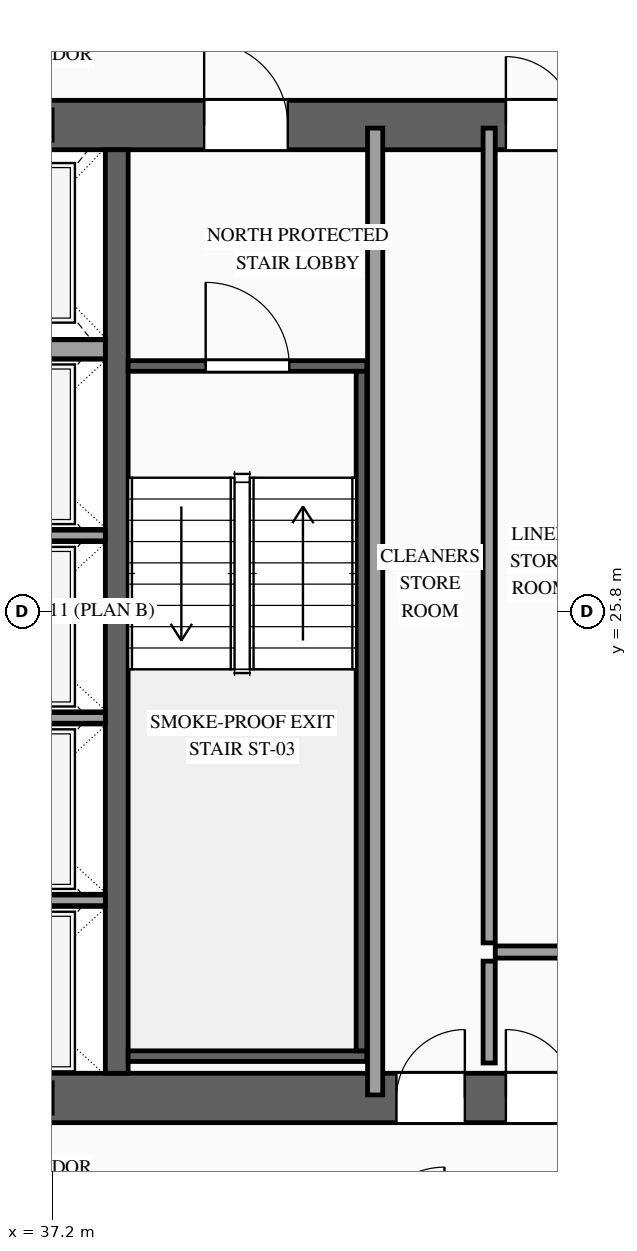
"""IFC4 building model, lengths in metres.
Left out: names, types, materials, properties, quantities, classifications, styles, units other than length and angle.
Written with IfcOpenShell. Run it as: python <this file> out.ifc"""

import sys

from ifc_helpers import new_model, si_unit, direction, frame, frame_2d, origin, place, context, subcontext, project, spatial, rectangle, extrude, source, transform, mapped, element, fill, save


model = new_model("IFC4")
c1 = context("Model", 3, precision=1e-05, world=origin(), true_north=direction((0.0, 1.0)))
c2 = subcontext(c1, "Body", "Model", "MODEL_VIEW")
j1 = project(units=[si_unit("LENGTHUNIT", "METRE"), si_unit("PLANEANGLEUNIT", "RADIAN")], contexts=[c1])
p1 = place(None, origin())
s1 = spatial("IfcSite", under=j1, at=p1, CompositionType="ELEMENT")
p2 = place(p1, origin())
s2 = spatial("IfcBuilding", under=s1, at=p2, CompositionType="ELEMENT")
p3 = place(p2, frame((0.0, 0.0, 181.0)))
s3 = spatial("IfcBuildingStorey", under=s2, at=p3, CompositionType="ELEMENT", Elevation=181.0)
p4 = place(p3, frame((23.475, 19.4, 0.0), z_axis=(0.0, 0.0, 1.0), x_axis=(1.0, 0.0, 0.0)))
e1 = element("IfcWall", 1, at=p4, inside=s3, PredefinedType="SHEAR", context=c2, shape_type="SweptSolid", body=[
    extrude(rectangle(XDim=27.05, YDim=0.65, at=frame_2d((13.525, 0.0))), origin(), (0.0, 0.0, 1.0), 3.5),
])
p5 = place(p4, frame((1.975, 0.0, 0.0)))
e2 = element("IfcOpeningElement", 2, at=p5, cuts=e1, PredefinedType="OPENING", context=c2, shape_type="SweptSolid", body=[
    extrude(rectangle(XDim=1.1, YDim=2.2, at=frame_2d((0.55, 1.1))), frame((0.0, 0.34, 0.0), z_axis=(0.0, -1.0, 0.0), x_axis=(1.0, 0.0, 0.0)), (0.0, 0.0, 1.0), 0.68),
])
p6 = place(p4, frame((9.875, 0.0, 0.0)))
e3 = element("IfcOpeningElement", 3, at=p6, cuts=e1, PredefinedType="OPENING", context=c2, shape_type="SweptSolid", body=[
    extrude(rectangle(XDim=1.1, YDim=2.2, at=frame_2d((0.55, 1.1))), frame((0.0, 0.34, 0.0), z_axis=(0.0, -1.0, 0.0), x_axis=(1.0, 0.0, 0.0)), (0.0, 0.0, 1.0), 0.68),
])
p7 = place(p4, frame((23.075, 0.0, 0.0)))
e4 = element("IfcOpeningElement", 4, at=p7, cuts=e1, PredefinedType="OPENING", context=c2, shape_type="SweptSolid", body=[
    extrude(rectangle(XDim=1.1, YDim=2.2, at=frame_2d((0.55, 1.1))), frame((0.0, 0.34, 0.0), z_axis=(0.0, -1.0, 0.0), x_axis=(1.0, 0.0, 0.0)), (0.0, 0.0, 1.0), 0.68),
])
p8 = place(p4, frame((19.695, 0.0, 0.0)))
e5 = element("IfcOpeningElement", 5, at=p8, cuts=e1, PredefinedType="OPENING", context=c2, shape_type="SweptSolid", body=[
    extrude(rectangle(XDim=0.9, YDim=2.15, at=frame_2d((0.45, 1.075))), frame((0.0, 0.34, 0.0), z_axis=(0.0, -1.0, 0.0), x_axis=(1.0, 0.0, 0.0)), (0.0, 0.0, 1.0), 0.68),
])
p9 = place(p4, frame((18.255, 0.0, 0.0)))
e6 = element("IfcOpeningElement", 6, at=p9, cuts=e1, PredefinedType="OPENING", context=c2, shape_type="SweptSolid", body=[
    extrude(rectangle(XDim=0.9, YDim=2.15, at=frame_2d((0.45, 1.075))), frame((0.0, 0.34, 0.0), z_axis=(0.0, -1.0, 0.0), x_axis=(1.0, 0.0, 0.0)), (0.0, 0.0, 1.0), 0.68),
])
p10 = place(p3, frame((23.475, 32.2, 0.0), z_axis=(0.0, 0.0, 1.0), x_axis=(1.0, 0.0, 0.0)))
e7 = element("IfcWall", 7, at=p10, inside=s3, PredefinedType="SHEAR", context=c2, shape_type="SweptSolid", body=[
    extrude(rectangle(XDim=27.05, YDim=0.65, at=frame_2d((13.525, 0.0))), origin(), (0.0, 0.0, 1.0), 3.5),
])
p11 = place(p10, frame((4.595, 0.0, 0.0)))
e8 = element("IfcOpeningElement", 8, at=p11, cuts=e7, PredefinedType="OPENING", context=c2, shape_type="SweptSolid", body=[
    extrude(rectangle(XDim=0.9, YDim=2.15, at=frame_2d((0.45, 1.075))), frame((0.0, 0.34, 0.0), z_axis=(0.0, -1.0, 0.0), x_axis=(1.0, 0.0, 0.0)), (0.0, 0.0, 1.0), 0.68),
])
p12 = place(p10, frame((9.875, 0.0, 0.0)))
e9 = element("IfcOpeningElement", 9, at=p12, cuts=e7, PredefinedType="OPENING", context=c2, shape_type="SweptSolid", body=[
    extrude(rectangle(XDim=1.1, YDim=2.2, at=frame_2d((0.55, 1.1))), frame((0.0, 0.34, 0.0), z_axis=(0.0, -1.0, 0.0), x_axis=(1.0, 0.0, 0.0)), (0.0, 0.0, 1.0), 0.68),
])
p13 = place(p10, frame((15.725, 0.0, 0.0)))
e10 = element("IfcOpeningElement", 10, at=p13, cuts=e7, PredefinedType="OPENING", context=c2, shape_type="SweptSolid", body=[
    extrude(rectangle(XDim=1.1, YDim=2.2, at=frame_2d((0.55, 1.1))), frame((0.0, 0.34, 0.0), z_axis=(0.0, -1.0, 0.0), x_axis=(1.0, 0.0, 0.0)), (0.0, 0.0, 1.0), 0.68),
])
p14 = place(p10, frame((19.695, 0.0, 0.0)))
e11 = element("IfcOpeningElement", 11, at=p14, cuts=e7, PredefinedType="OPENING", context=c2, shape_type="SweptSolid", body=[
    extrude(rectangle(XDim=0.9, YDim=2.15, at=frame_2d((0.45, 1.075))), frame((0.0, 0.34, 0.0), z_axis=(0.0, -1.0, 0.0), x_axis=(1.0, 0.0, 0.0)), (0.0, 0.0, 1.0), 0.68),
])
m1 = source(origin(), c2, "Body", "SweptSolid", [
    extrude(rectangle(XDim=12.15, YDim=0.3, at=frame_2d((6.075, 0.0))), origin(), (0.0, 0.0, 1.0), 3.5),
])
p15 = place(p3, frame((38.05, 19.725, 0.0), z_axis=(0.0, 0.0, 1.0), x_axis=(0.0, 1.0, 0.0)))
e12 = element("IfcWall", 12, at=p15, inside=s3, PredefinedType="SOLIDWALL", context=c2, shape_type="MappedRepresentation", body=[
    mapped(m1, transform((0.0, 0.0, 0.0), scale=1.0)),
])
m2 = source(origin(), c2, "Body", "SweptSolid", [
    extrude(rectangle(XDim=2.4, YDim=0.14, at=frame_2d((1.2, 0.0))), origin(), (0.0, 0.0, 1.0), 3.28),
])
for number, where, z_axis, x_axis in (
    (13, (35.5, 22.0, 0.0), (0.0, 0.0, 1.0), (1.0, 0.0, 0.0)),
    (14, (35.5, 24.4, 0.0), (0.0, 0.0, 1.0), (1.0, 0.0, 0.0)),
    (15, (35.5, 26.8, 0.0), (0.0, 0.0, 1.0), (1.0, 0.0, 0.0)),
):
    element("IfcWall", number, at=place(p3, frame(where, z_axis=z_axis, x_axis=x_axis)), inside=s3, PredefinedType="SOLIDWALL", context=c2, shape_type="MappedRepresentation", body=[
        mapped(m2, transform((0.0, 0.0, 0.0), scale=1.0)),
    ])
m3 = source(origin(), c2, "Body", "SweptSolid", [
    extrude(rectangle(XDim=2.4, YDim=0.25, at=frame_2d((1.2, 0.0))), origin(), (0.0, 0.0, 1.0), 3.28),
])
p16 = place(p3, frame((35.5, 29.25, 0.0), z_axis=(0.0, 0.0, 1.0), x_axis=(1.0, 0.0, 0.0)))
e16 = element("IfcWall", 16, at=p16, inside=s3, PredefinedType="SOLIDWALL", context=c2, shape_type="MappedRepresentation", body=[
    mapped(m3, transform((0.0, 0.0, 0.0), scale=1.0)),
])
p17 = place(p3, frame((38.2, 29.03, 0.0), z_axis=(0.0, 0.0, 1.0), x_axis=(1.0, 0.0, 0.0)))
e17 = element("IfcWall", 17, at=p17, inside=s3, PredefinedType="SOLIDWALL", context=c2, shape_type="SweptSolid", body=[
    extrude(rectangle(XDim=3.14, YDim=0.14, at=frame_2d((1.57, 0.0))), origin(), (0.0, 0.0, 1.0), 3.28),
])
p18 = place(p17, frame((1.02, 0.0, 0.0)))
e18 = element("IfcOpeningElement", 18, at=p18, cuts=e17, PredefinedType="OPENING", context=c2, shape_type="SweptSolid", body=[
    extrude(rectangle(XDim=1.1, YDim=2.2, at=frame_2d((0.55, 1.1))), frame((0.0, 0.085, 0.0), z_axis=(0.0, -1.0, 0.0), x_axis=(1.0, 0.0, 0.0)), (0.0, 0.0, 1.0), 0.17),
])
m4 = source(origin(), c2, "Body", "SweptSolid", [
    extrude(rectangle(XDim=3.14, YDim=0.14, at=frame_2d((1.57, 0.0))), origin(), (0.0, 0.0, 1.0), 3.28),
])
p19 = place(p3, frame((38.2, 19.95, 0.0), z_axis=(0.0, 0.0, 1.0), x_axis=(1.0, 0.0, 0.0)))
e19 = element("IfcWall", 19, at=p19, inside=s3, PredefinedType="SOLIDWALL", context=c2, shape_type="MappedRepresentation", body=[
    mapped(m4, transform((0.0, 0.0, 0.0), scale=1.0)),
])
m5 = source(origin(), c2, "Body", "SweptSolid", [
    extrude(rectangle(XDim=8.94, YDim=0.14, at=frame_2d((4.47, 0.0))), origin(), (0.0, 0.0, 1.0), 3.28),
])
p20 = place(p3, frame((41.27, 20.02, 0.0), z_axis=(0.0, 0.0, 1.0), x_axis=(0.0, 1.0, 0.0)))
e20 = element("IfcWall", 20, at=p20, inside=s3, PredefinedType="SOLIDWALL", context=c2, shape_type="MappedRepresentation", body=[
    mapped(m5, transform((0.0, 0.0, 0.0), scale=1.0)),
])
m6 = source(origin(), c2, "Body", "SweptSolid", [
    extrude(rectangle(XDim=1.34, YDim=0.16, at=frame_2d((0.67, 0.0))), origin(), (0.0, 0.0, 1.0), 3.28),
])
p21 = place(p3, frame((42.95, 19.86, 0.0), z_axis=(0.0, 0.0, 1.0), x_axis=(0.0, 1.0, 0.0)))
e21 = element("IfcWall", 21, at=p21, inside=s3, PredefinedType="PARTITIONING", context=c2, shape_type="MappedRepresentation", body=[
    mapped(m6, transform((0.0, 0.0, 0.0), scale=1.0)),
])
m7 = source(origin(), c2, "Body", "SweptSolid", [
    extrude(rectangle(XDim=1.17, YDim=0.16, at=frame_2d((0.585, 0.0))), origin(), (0.0, 0.0, 1.0), 3.28),
])
p22 = place(p3, frame((43.03, 21.32, 0.0), z_axis=(0.0, 0.0, 1.0), x_axis=(1.0, 0.0, 0.0)))
e22 = element("IfcWall", 22, at=p22, inside=s3, PredefinedType="PARTITIONING", context=c2, shape_type="MappedRepresentation", body=[
    mapped(m7, transform((0.0, 0.0, 0.0), scale=1.0)),
])
m8 = source(origin(), c2, "Body", "SweptSolid", [
    extrude(rectangle(XDim=12.72, YDim=0.2, at=frame_2d((6.36, 0.0))), origin(), (0.0, 0.0, 1.0), 3.28),
])
p23 = place(p3, frame((41.45, 19.44, 0.0), z_axis=(0.0, 0.0, 1.0), x_axis=(0.0, 1.0, 0.0)))
e23 = element("IfcWall", 23, at=p23, inside=s3, PredefinedType="PARTITIONING", context=c2, shape_type="MappedRepresentation", body=[
    mapped(m8, transform((0.0, 0.0, 0.0), scale=1.0)),
])
m9 = source(origin(), c2, "Body", "SweptSolid", [
    extrude(rectangle(XDim=10.72, YDim=0.16, at=frame_2d((5.36, 0.0))), origin(), (0.0, 0.0, 1.0), 3.28),
])
p24 = place(p3, frame((42.95, 21.44, 0.0), z_axis=(0.0, 0.0, 1.0), x_axis=(0.0, 1.0, 0.0)))
e24 = element("IfcWall", 24, at=p24, inside=s3, PredefinedType="PARTITIONING", context=c2, shape_type="MappedRepresentation", body=[
    mapped(m9, transform((0.0, 0.0, 0.0), scale=1.0)),
])
m10 = source(origin(), c2, "Body", "SweptSolid", [
    extrude(rectangle(XDim=1.1, YDim=2.2, at=frame_2d((0.55, 1.1))), frame((0.0, 0.025, 0.0), z_axis=(0.0, -1.0, 0.0), x_axis=(1.0, 0.0, 0.0)), (0.0, 0.0, 1.0), 0.05),
])
p25 = place(p18, origin())
e25 = element("IfcDoor", 25, at=p25, inside=s3, OperationType="SINGLE_SWING_LEFT", PredefinedType="DOOR", context=c2, shape_type="MappedRepresentation", body=[
    mapped(m10, transform((0.0, 0.0, 0.0), scale=1.0)),
])
fill(e18, e25)
p26 = place(p13, origin())
e26 = element("IfcDoor", 26, at=p26, inside=s3, OperationType="SINGLE_SWING_LEFT", PredefinedType="DOOR", context=c2, shape_type="MappedRepresentation", body=[
    mapped(m10, transform((0.0, 0.0, 0.0), scale=1.0)),
])
fill(e10, e26)
m11 = source(origin(), c2, "Body", "SweptSolid", [
    extrude(rectangle(XDim=0.9, YDim=2.15, at=frame_2d((0.45, 1.075))), frame((0.0, 0.025, 0.0), z_axis=(0.0, -1.0, 0.0), x_axis=(1.0, 0.0, 0.0)), (0.0, 0.0, 1.0), 0.05),
])
p27 = place(p8, origin())
e27 = element("IfcDoor", 27, at=p27, inside=s3, OperationType="SINGLE_SWING_LEFT", PredefinedType="DOOR", context=c2, shape_type="MappedRepresentation", body=[
    mapped(m11, transform((0.0, 0.0, 0.0), scale=1.0)),
])
fill(e5, e27)
p28 = place(p9, origin())
e28 = element("IfcDoor", 28, at=p28, inside=s3, OperationType="SINGLE_SWING_RIGHT", PredefinedType="DOOR", context=c2, shape_type="MappedRepresentation", body=[
    mapped(m11, transform((0.0, 0.0, 0.0), scale=1.0)),
])
fill(e6, e28)
p29 = place(p14, origin())
e29 = element("IfcDoor", 29, at=p29, inside=s3, OperationType="SINGLE_SWING_LEFT", PredefinedType="DOOR", context=c2, shape_type="MappedRepresentation", body=[
    mapped(m11, transform((0.0, 0.0, 0.0), scale=1.0)),
])
fill(e11, e29)
save(model, sys.argv[1])
